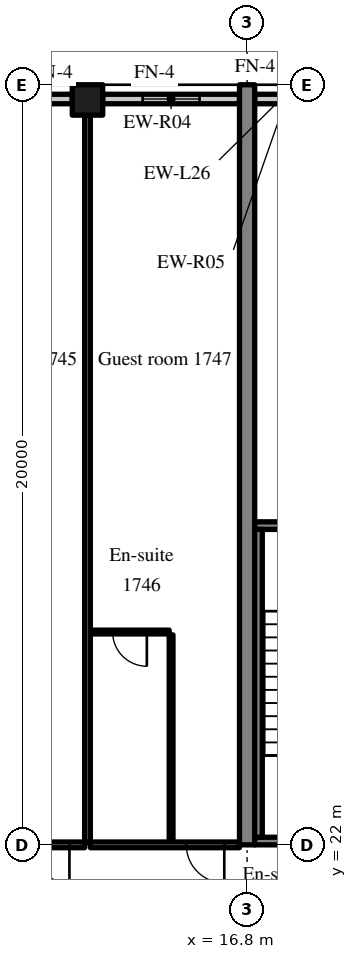
"""IFC4 building model, lengths in metres.
Left out: names, types, materials, properties, quantities, classifications, styles, units other than length and angle.
Written with IfcOpenShell. Run it as: python <this file> out.ifc"""

import sys

from ifc_helpers import new_model, si_unit, direction, frame, frame_2d, origin, origin_2d, place, context, subcontext, project, spatial, rectangle, extrude, source, transform, mapped, element, fill, save


model = new_model("IFC4")
c1 = context("Model", 3, precision=1e-05, world=origin(), true_north=direction((0.0, 1.0)))
c2 = subcontext(c1, "Body", "Model", "MODEL_VIEW")
j1 = project(units=[si_unit("LENGTHUNIT", "METRE"), si_unit("PLANEANGLEUNIT", "RADIAN")], contexts=[c1])
p1 = place(None, origin())
s1 = spatial("IfcSite", under=j1, at=p1, CompositionType="ELEMENT")
p2 = place(p1, origin())
s2 = spatial("IfcBuilding", under=s1, at=p2, CompositionType="ELEMENT")
p3 = place(p2, frame((0.0, 0.0, 73.4)))
s3 = spatial("IfcBuildingStorey", under=s2, at=p3, CompositionType="ELEMENT", Elevation=73.4)
m1 = source(origin(), c2, "Body", "SweptSolid", [
    extrude(rectangle(XDim=20.0, YDim=0.4, at=frame_2d((10.0, 0.0))), origin(), (0.0, 0.0, 1.0), 3.52),
])
p4 = place(p3, frame((16.8, 22.0, 0.0), z_axis=(0.0, 0.0, 1.0), x_axis=(0.0, 1.0, 0.0)))
e1 = element("IfcWall", 1, at=p4, inside=s3, PredefinedType="SHEAR", context=c2, shape_type="MappedRepresentation", body=[
    mapped(m1, transform((0.0, 0.0, 0.0), scale=1.0)),
])
m2 = source(origin(), c2, "Body", "SweptSolid", [
    extrude(rectangle(XDim=0.8, YDim=0.8, at=origin_2d()), origin(), (0.0, 0.0, 1.0), 3.52),
])
p5 = place(p3, frame((12.6, 41.6, 0.0), z_axis=(0.0, 0.0, 1.0), x_axis=(1.0, 0.0, 0.0)))
e2 = element("IfcColumn", 2, at=p5, inside=s3, PredefinedType="COLUMN", context=c2, shape_type="MappedRepresentation", body=[
    mapped(m2, transform((0.0, 0.0, 0.0), scale=1.0)),
])
m3 = source(origin(), c2, "Body", "SweptSolid", [
    extrude(rectangle(XDim=3.6, YDim=0.25, at=frame_2d((1.8, 0.0))), origin(), (0.0, 0.0, 1.0), 2.82),
])
p6 = place(p3, frame((12.2, 41.625, 0.0), z_axis=(0.0, 0.0, 1.0), x_axis=(-1.0, 0.0, 0.0)))
e3 = element("IfcWall", 3, at=p6, inside=s3, PredefinedType="SOLIDWALL", context=c2, shape_type="MappedRepresentation", body=[
    mapped(m3, transform((0.0, 0.0, 0.0), scale=1.0)),
])
m4 = source(origin(), c2, "Body", "SweptSolid", [
    extrude(rectangle(XDim=1.5, YDim=1.5, at=frame_2d((0.75, 0.75))), frame((0.0, 0.135, 0.0), z_axis=(0.0, -1.0, 0.0), x_axis=(1.0, 0.0, 0.0)), (0.0, 0.0, 1.0), 0.27),
])
p7 = place(p6, frame((1.05, 0.0, 0.9)))
e4 = element("IfcOpeningElement", 4, at=p7, cuts=e3, PredefinedType="OPENING", context=c2, shape_type="MappedRepresentation", body=[
    mapped(m4, transform((0.0, 0.0, 0.0), scale=1.0)),
])
m5 = source(origin(), c2, "Body", "SweptSolid", [
    extrude(rectangle(XDim=3.6, YDim=0.25, at=frame_2d((1.8, 0.0))), origin(), (0.0, 0.0, 1.0), 2.82),
])
p8 = place(p3, frame((16.6, 41.625, 0.0), z_axis=(0.0, 0.0, 1.0), x_axis=(-1.0, 0.0, 0.0)))
e5 = element("IfcWall", 5, at=p8, inside=s3, PredefinedType="SOLIDWALL", context=c2, shape_type="MappedRepresentation", body=[
    mapped(m5, transform((0.0, 0.0, 0.0), scale=1.0)),
])
p9 = place(p8, frame((1.05, 0.0, 0.9)))
e6 = element("IfcOpeningElement", 6, at=p9, cuts=e5, PredefinedType="OPENING", context=c2, shape_type="MappedRepresentation", body=[
    mapped(m4, transform((0.0, 0.0, 0.0), scale=1.0)),
])
m6 = source(origin(), c2, "Body", "SweptSolid", [
    extrude(rectangle(XDim=1.658, YDim=0.25, at=frame_2d((0.829, 0.0))), origin(), (0.0, 0.0, 1.0), 2.82),
])
p10 = place(p3, frame((18.658, 41.625, 0.0), z_axis=(0.0, 0.0, 1.0), x_axis=(-1.0, 0.0, 0.0)))
e7 = element("IfcWall", 7, at=p10, inside=s3, PredefinedType="SOLIDWALL", context=c2, shape_type="MappedRepresentation", body=[
    mapped(m6, transform((0.0, 0.0, 0.0), scale=1.0)),
])
m7 = source(origin(), c2, "Body", "SweptSolid", [
    extrude(rectangle(XDim=8.2, YDim=0.2, at=frame_2d((4.1, 0.0))), origin(), (0.0, 0.0, 1.0), 3.52),
])
p11 = place(p3, frame((17.0, 22.1, 0.0), z_axis=(0.0, 0.0, 1.0), x_axis=(1.0, 0.0, 0.0)))
e8 = element("IfcWall", 8, at=p11, inside=s3, PredefinedType="SOLIDWALL", context=c2, shape_type="MappedRepresentation", body=[
    mapped(m7, transform((0.0, 0.0, 0.0), scale=1.0)),
])
m8 = source(origin(), c2, "Body", "SweptSolid", [
    extrude(rectangle(XDim=1.2, YDim=2.1, at=frame_2d((0.6, 1.05))), frame((0.0, 0.11, 0.0), z_axis=(0.0, -1.0, 0.0), x_axis=(1.0, 0.0, 0.0)), (0.0, 0.0, 1.0), 0.22),
])
p12 = place(p11, frame((6.0, 0.0, 0.0)))
e9 = element("IfcOpeningElement", 9, at=p12, cuts=e8, PredefinedType="OPENING", context=c2, shape_type="MappedRepresentation", body=[
    mapped(m8, transform((0.0, 0.0, 0.0), scale=1.0)),
])
p13 = place(p3, frame((17.0, 30.4, 0.0), z_axis=(0.0, 0.0, 1.0), x_axis=(1.0, 0.0, 0.0)))
e10 = element("IfcWall", 10, at=p13, inside=s3, PredefinedType="SOLIDWALL", context=c2, shape_type="MappedRepresentation", body=[
    mapped(m7, transform((0.0, 0.0, 0.0), scale=1.0)),
])
m9 = source(origin(), c2, "Body", "SweptSolid", [
    extrude(rectangle(XDim=1.0, YDim=2.1, at=frame_2d((0.5, 1.05))), frame((0.0, 0.11, 0.0), z_axis=(0.0, -1.0, 0.0), x_axis=(1.0, 0.0, 0.0)), (0.0, 0.0, 1.0), 0.22),
])
p14 = place(p13, frame((6.1, 0.0, 0.0)))
e11 = element("IfcOpeningElement", 11, at=p14, cuts=e10, PredefinedType="OPENING", context=c2, shape_type="MappedRepresentation", body=[
    mapped(m9, transform((0.0, 0.0, 0.0), scale=1.0)),
])
m10 = source(origin(), c2, "Body", "SweptSolid", [
    extrude(rectangle(XDim=8.1, YDim=0.2, at=frame_2d((4.05, 0.0))), origin(), (0.0, 0.0, 1.0), 3.52),
])
p15 = place(p3, frame((17.1, 22.2, 0.0), z_axis=(0.0, 0.0, 1.0), x_axis=(0.0, 1.0, 0.0)))
e12 = element("IfcWall", 12, at=p15, inside=s3, PredefinedType="SOLIDWALL", context=c2, shape_type="MappedRepresentation", body=[
    mapped(m10, transform((0.0, 0.0, 0.0), scale=1.0)),
])
m11 = source(origin(), c2, "Body", "SweptSolid", [
    extrude(rectangle(XDim=3.925, YDim=0.15, at=frame_2d((1.962, 0.0))), origin(), (0.0, 0.0, 1.0), 2.82),
])
p16 = place(p3, frame((8.6, 22.0, 0.0), z_axis=(0.0, 0.0, 1.0), x_axis=(1.0, 0.0, 0.0)))
e13 = element("IfcWall", 13, at=p16, inside=s3, PredefinedType="PARTITIONING", context=c2, shape_type="MappedRepresentation", body=[
    mapped(m11, transform((0.0, 0.0, 0.0), scale=1.0)),
])
m12 = source(origin(), c2, "Body", "SweptSolid", [
    extrude(rectangle(XDim=1.0, YDim=2.1, at=frame_2d((0.5, 1.05))), frame((0.0, 0.085, 0.0), z_axis=(0.0, -1.0, 0.0), x_axis=(1.0, 0.0, 0.0)), (0.0, 0.0, 1.0), 0.17),
])
p17 = place(p16, frame((2.525, 0.0, 0.0)))
e14 = element("IfcOpeningElement", 14, at=p17, cuts=e13, PredefinedType="OPENING", context=c2, shape_type="MappedRepresentation", body=[
    mapped(m12, transform((0.0, 0.0, 0.0), scale=1.0)),
])
m13 = source(origin(), c2, "Body", "SweptSolid", [
    extrude(rectangle(XDim=5.45, YDim=0.1, at=frame_2d((2.725, 0.0))), origin(), (0.0, 0.0, 1.0), 3.52),
])
p18 = place(p3, frame((14.8, 22.075, 0.0), z_axis=(0.0, 0.0, 1.0), x_axis=(0.0, 1.0, 0.0)))
e15 = element("IfcWall", 15, at=p18, inside=s3, PredefinedType="PARTITIONING", context=c2, shape_type="MappedRepresentation", body=[
    mapped(m13, transform((0.0, 0.0, 0.0), scale=1.0)),
])
m14 = source(origin(), c2, "Body", "SweptSolid", [
    extrude(rectangle(XDim=2.075, YDim=0.1, at=frame_2d((1.038, 0.0))), origin(), (0.0, 0.0, 1.0), 3.52),
])
p19 = place(p3, frame((12.675, 27.6, 0.0), z_axis=(0.0, 0.0, 1.0), x_axis=(1.0, 0.0, 0.0)))
e16 = element("IfcWall", 16, at=p19, inside=s3, PredefinedType="PARTITIONING", context=c2, shape_type="MappedRepresentation", body=[
    mapped(m14, transform((0.0, 0.0, 0.0), scale=1.0)),
])
m15 = source(origin(), c2, "Body", "SweptSolid", [
    extrude(rectangle(XDim=0.9, YDim=2.1, at=frame_2d((0.45, 1.05))), frame((0.0, 0.06, 0.0), z_axis=(0.0, -1.0, 0.0), x_axis=(1.0, 0.0, 0.0)), (0.0, 0.0, 1.0), 0.12),
])
p20 = place(p19, frame((0.587, 0.0, 0.0)))
e17 = element("IfcOpeningElement", 17, at=p20, cuts=e16, PredefinedType="OPENING", context=c2, shape_type="MappedRepresentation", body=[
    mapped(m15, transform((0.0, 0.0, 0.0), scale=1.0)),
])
m16 = source(origin(), c2, "Body", "SweptSolid", [
    extrude(rectangle(XDim=3.925, YDim=0.15, at=frame_2d((1.962, 0.0))), origin(), (0.0, 0.0, 1.0), 2.82),
])
p21 = place(p3, frame((12.675, 22.0, 0.0), z_axis=(0.0, 0.0, 1.0), x_axis=(1.0, 0.0, 0.0)))
e18 = element("IfcWall", 18, at=p21, inside=s3, PredefinedType="PARTITIONING", context=c2, shape_type="MappedRepresentation", body=[
    mapped(m16, transform((0.0, 0.0, 0.0), scale=1.0)),
])
p22 = place(p21, frame((2.525, 0.0, 0.0)))
e19 = element("IfcOpeningElement", 19, at=p22, cuts=e18, PredefinedType="OPENING", context=c2, shape_type="MappedRepresentation", body=[
    mapped(m12, transform((0.0, 0.0, 0.0), scale=1.0)),
])
m17 = source(origin(), c2, "Body", "SweptSolid", [
    extrude(rectangle(XDim=19.125, YDim=0.15, at=frame_2d((9.562, 0.0))), origin(), (0.0, 0.0, 1.0), 3.52),
])
p23 = place(p3, frame((12.6, 22.075, 0.0), z_axis=(0.0, 0.0, 1.0), x_axis=(0.0, 1.0, 0.0)))
e20 = element("IfcWall", 20, at=p23, inside=s3, PredefinedType="PARTITIONING", context=c2, shape_type="MappedRepresentation", body=[
    mapped(m17, transform((0.0, 0.0, 0.0), scale=1.0)),
])
m18 = source(origin(), c2, "Body", "SweptSolid", [
    extrude(rectangle(XDim=1.5, YDim=1.5, at=frame_2d((0.75, 0.75))), frame((0.0, 0.03, 0.0), z_axis=(0.0, -1.0, 0.0), x_axis=(1.0, 0.0, 0.0)), (0.0, 0.0, 1.0), 0.06),
])
p24 = place(p9, origin())
e21 = element("IfcWindow", 21, at=p24, inside=s3, PartitioningType="SINGLE_PANEL", PredefinedType="WINDOW", context=c2, shape_type="MappedRepresentation", body=[
    mapped(m18, transform((0.0, 0.0, 0.0), scale=1.0)),
])
fill(e6, e21)
m19 = source(origin(), c2, "Body", "SweptSolid", [
    extrude(rectangle(XDim=1.0, YDim=2.1, at=frame_2d((0.5, 1.05))), frame((0.0, 0.025, 0.0), z_axis=(0.0, -1.0, 0.0), x_axis=(1.0, 0.0, 0.0)), (0.0, 0.0, 1.0), 0.05),
])
p25 = place(p17, origin())
e22 = element("IfcDoor", 22, at=p25, inside=s3, OperationType="SINGLE_SWING_RIGHT", PredefinedType="DOOR", context=c2, shape_type="MappedRepresentation", body=[
    mapped(m19, transform((0.0, 0.0, 0.0), scale=1.0)),
])
fill(e14, e22)
m20 = source(origin(), c2, "Body", "SweptSolid", [
    extrude(rectangle(XDim=0.9, YDim=2.1, at=frame_2d((0.45, 1.05))), frame((0.0, 0.025, 0.0), z_axis=(0.0, -1.0, 0.0), x_axis=(1.0, 0.0, 0.0)), (0.0, 0.0, 1.0), 0.05),
])
p26 = place(p20, origin())
e23 = element("IfcDoor", 23, at=p26, inside=s3, OperationType="SINGLE_SWING_RIGHT", PredefinedType="DOOR", context=c2, shape_type="MappedRepresentation", body=[
    mapped(m20, transform((0.0, 0.0, 0.0), scale=1.0)),
])
fill(e17, e23)
p27 = place(p22, origin())
e24 = element("IfcDoor", 24, at=p27, inside=s3, OperationType="SINGLE_SWING_RIGHT", PredefinedType="DOOR", context=c2, shape_type="MappedRepresentation", body=[
    mapped(m19, transform((0.0, 0.0, 0.0), scale=1.0)),
])
fill(e19, e24)
save(model, sys.argv[1])
